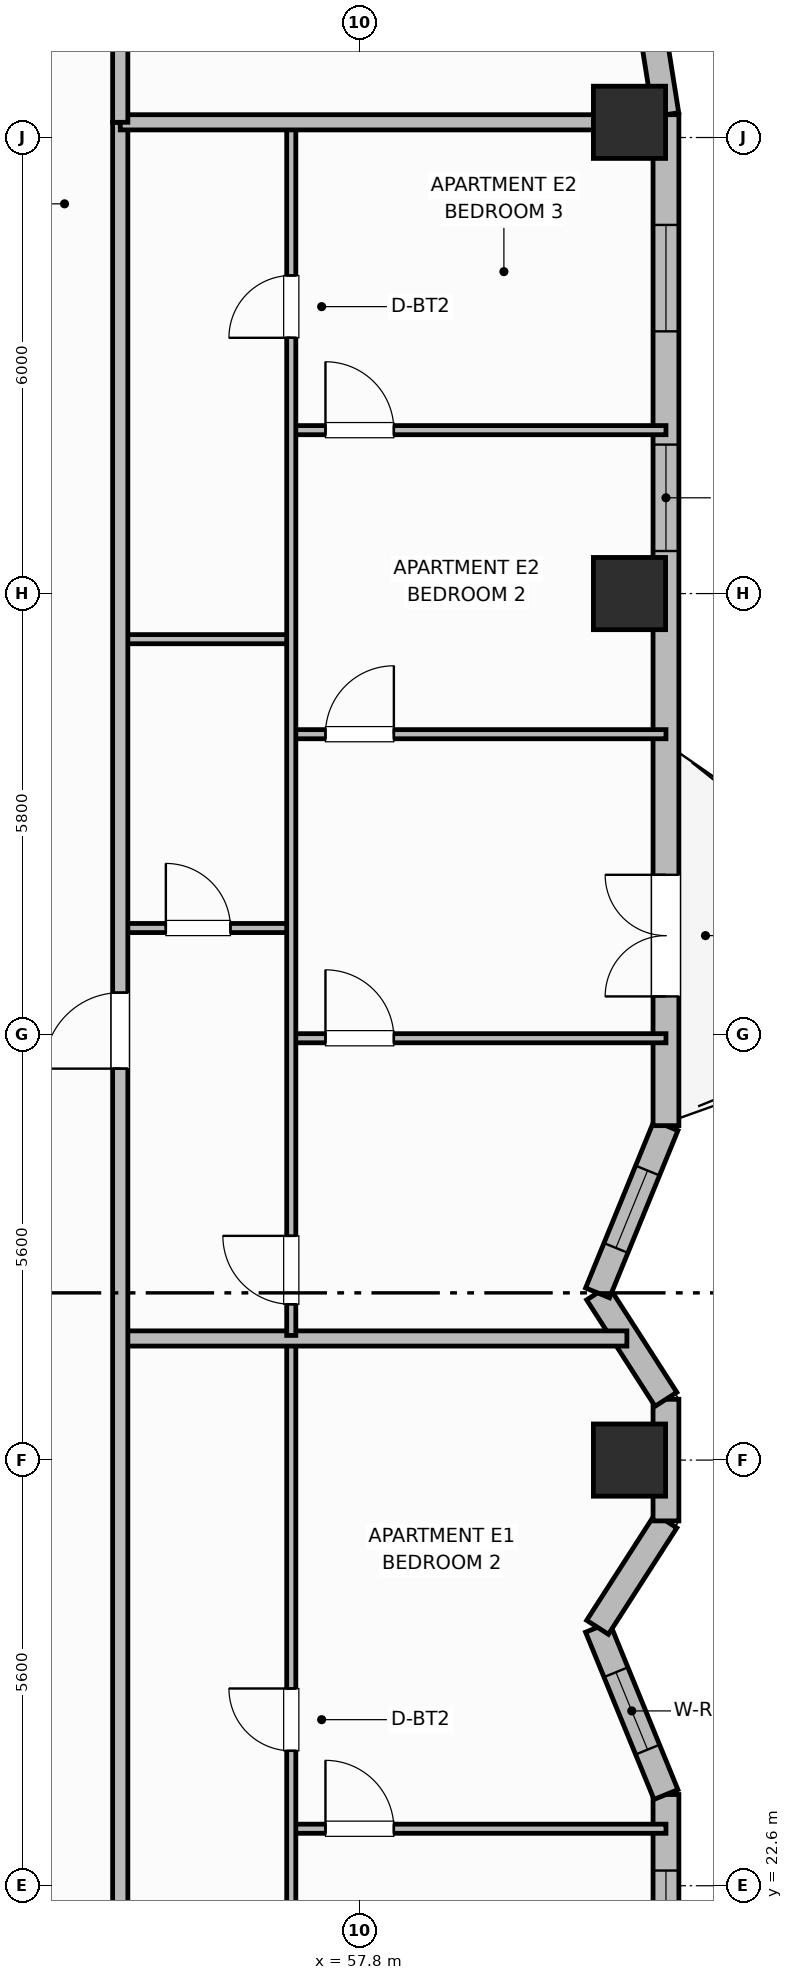
"""IFC4 building model, lengths in metres.
Left out: names, types, materials, properties, quantities, classifications, styles, units other than length and angle.
Written with IfcOpenShell. Run it as: python <this file> out.ifc"""

import sys

from ifc_helpers import new_model, si_unit, direction, frame, frame_2d, origin, origin_2d, place, context, subcontext, project, spatial, rectangle, extrude, element, fill, save


model = new_model("IFC4")
c1 = context("Model", 3, precision=1e-05, world=origin(), true_north=direction((0.0, 1.0)))
c2 = subcontext(c1, "Body", "Model", "MODEL_VIEW")
j1 = project(units=[si_unit("LENGTHUNIT", "METRE"), si_unit("PLANEANGLEUNIT", "RADIAN")], contexts=[c1])
p1 = place(None, origin())
s1 = spatial("IfcSite", under=j1, at=p1, CompositionType="ELEMENT")
p2 = place(p1, origin())
s2 = spatial("IfcBuilding", under=s1, at=p2, CompositionType="ELEMENT")
p3 = place(p2, frame((0.0, 0.0, 162.6)))
s3 = spatial("IfcBuildingStorey", under=s2, at=p3, CompositionType="ELEMENT", Elevation=162.6)
for number, where, z_axis, x_axis in (
    (1, (61.35, 28.2, 0.0), (0.0, 0.0, 1.0), (1.0, 0.0, 0.0)),
    (2, (61.35, 39.6, 0.0), (0.0, 0.0, 1.0), (1.0, 0.0, 0.0)),
    (3, (61.35, 45.8, 0.0), (0.0, 0.0, 1.0), (1.0, 0.0, 0.0)),
):
    element("IfcColumn", number, at=place(p3, frame(where, z_axis=z_axis, x_axis=x_axis)), inside=s3, PredefinedType="COLUMN", context=c2, shape_type="SweptSolid", body=[
        extrude(rectangle(XDim=0.95, YDim=0.95, at=origin_2d()), origin(), (0.0, 0.0, 1.0), 3.7),
    ])
p4 = place(p3, frame((61.83, 10.5, 0.0), z_axis=(0.0, 0.0, 1.0), x_axis=(0.0, 1.0, 0.0)))
e4 = element("IfcWall", 4, at=p4, inside=s3, PredefinedType="SOLIDWALL", context=c2, shape_type="SweptSolid", body=[
    extrude(rectangle(XDim=13.3, YDim=0.34, at=frame_2d((6.65, 0.0))), origin(), (0.0, 0.0, 1.0), 2.72),
])
p5 = place(p4, frame((1.35, 0.0, 0.7)))
e5 = element("IfcOpeningElement", 5, at=p5, cuts=e4, PredefinedType="OPENING", context=c2, shape_type="SweptSolid", body=[
    extrude(rectangle(XDim=1.6, YDim=1.9, at=frame_2d((0.8, 0.95))), frame((0.0, 0.18, 0.0), z_axis=(0.0, -1.0, 0.0), x_axis=(1.0, 0.0, 0.0)), (0.0, 0.0, 1.0), 0.36),
])
p6 = place(p4, frame((8.4, 0.0, 0.7)))
e6 = element("IfcOpeningElement", 6, at=p6, cuts=e4, PredefinedType="OPENING", context=c2, shape_type="SweptSolid", body=[
    extrude(rectangle(XDim=1.6, YDim=1.9, at=frame_2d((0.8, 0.95))), frame((0.0, 0.18, 0.0), z_axis=(0.0, -1.0, 0.0), x_axis=(1.0, 0.0, 0.0)), (0.0, 0.0, 1.0), 0.36),
])
p7 = place(p4, frame((10.7, 0.0, 0.7)))
e7 = element("IfcOpeningElement", 7, at=p7, cuts=e4, PredefinedType="OPENING", context=c2, shape_type="SweptSolid", body=[
    extrude(rectangle(XDim=1.6, YDim=1.9, at=frame_2d((0.8, 0.95))), frame((0.0, 0.18, 0.0), z_axis=(0.0, -1.0, 0.0), x_axis=(1.0, 0.0, 0.0)), (0.0, 0.0, 1.0), 0.36),
])
p8 = place(p3, frame((61.83, 23.8, 0.0), z_axis=(0.0, 0.0, 1.0), x_axis=(-0.378692835005, 0.925522412865, 0.0)))
e8 = element("IfcWall", 8, at=p8, inside=s3, PredefinedType="SOLIDWALL", context=c2, shape_type="SweptSolid", body=[
    extrude(rectangle(XDim=2.377, YDim=0.34, at=frame_2d((1.188, 0.0))), origin(), (0.0, 0.0, 1.0), 2.72),
])
p9 = place(p8, frame((0.638, 0.0, 0.91)))
e9 = element("IfcOpeningElement", 9, at=p9, cuts=e8, PredefinedType="OPENING", context=c2, shape_type="SweptSolid", body=[
    extrude(rectangle(XDim=1.1, YDim=1.65, at=frame_2d((0.55, 0.825))), frame((0.0, 0.18, 0.0), z_axis=(0.0, -1.0, 0.0), x_axis=(1.0, 0.0, 0.0)), (0.0, 0.0, 1.0), 0.36),
])
p10 = place(p3, frame((60.93, 26.0, 0.0), z_axis=(0.0, 0.0, 1.0), x_axis=(0.540846555596, 0.841121277403, 0.0)))
e10 = element("IfcWall", 10, at=p10, inside=s3, PredefinedType="SOLIDWALL", context=c2, shape_type="SweptSolid", body=[
    extrude(rectangle(XDim=1.664, YDim=0.34, at=frame_2d((0.832, 0.0))), origin(), (0.0, 0.0, 1.0), 2.72),
])
p11 = place(p3, frame((61.83, 27.4, 0.0), z_axis=(0.0, 0.0, 1.0), x_axis=(0.0, 1.0, 0.0)))
e11 = element("IfcWall", 11, at=p11, inside=s3, PredefinedType="SOLIDWALL", context=c2, shape_type="SweptSolid", body=[
    extrude(rectangle(XDim=1.6, YDim=0.34, at=frame_2d((0.8, 0.0))), origin(), (0.0, 0.0, 1.0), 2.72),
])
p12 = place(p3, frame((61.83, 29.0, 0.0), z_axis=(0.0, 0.0, 1.0), x_axis=(-0.540846555596, 0.841121277403, 0.0)))
e12 = element("IfcWall", 12, at=p12, inside=s3, PredefinedType="SOLIDWALL", context=c2, shape_type="SweptSolid", body=[
    extrude(rectangle(XDim=1.664, YDim=0.34, at=frame_2d((0.832, 0.0))), origin(), (0.0, 0.0, 1.0), 2.72),
])
p13 = place(p3, frame((60.93, 30.4, 0.0), z_axis=(0.0, 0.0, 1.0), x_axis=(0.378656839344, 0.925537140269, 0.0)))
e13 = element("IfcWall", 13, at=p13, inside=s3, PredefinedType="SOLIDWALL", context=c2, shape_type="SweptSolid", body=[
    extrude(rectangle(XDim=2.377, YDim=0.34, at=frame_2d((1.188, 0.0))), origin(), (0.0, 0.0, 1.0), 2.72),
])
p14 = place(p13, frame((0.638, 0.0, 0.91)))
e14 = element("IfcOpeningElement", 14, at=p14, cuts=e13, PredefinedType="OPENING", context=c2, shape_type="SweptSolid", body=[
    extrude(rectangle(XDim=1.1, YDim=1.65, at=frame_2d((0.55, 0.825))), frame((0.0, 0.18, 0.0), z_axis=(0.0, -1.0, 0.0), x_axis=(1.0, 0.0, 0.0)), (0.0, 0.0, 1.0), 0.36),
])
p15 = place(p3, frame((61.83, 32.6, 0.0), z_axis=(0.0, 0.0, 1.0), x_axis=(0.0, 1.0, 0.0)))
e15 = element("IfcWall", 15, at=p15, inside=s3, PredefinedType="SOLIDWALL", context=c2, shape_type="SweptSolid", body=[
    extrude(rectangle(XDim=13.3, YDim=0.34, at=frame_2d((6.65, 0.0))), origin(), (0.0, 0.0, 1.0), 2.72),
])
p16 = place(p15, frame((1.7, 0.0, 0.0)))
e16 = element("IfcOpeningElement", 16, at=p16, cuts=e15, PredefinedType="OPENING", context=c2, shape_type="SweptSolid", body=[
    extrude(rectangle(XDim=1.6, YDim=2.1, at=frame_2d((0.8, 1.05))), frame((0.0, 0.18, 0.0), z_axis=(0.0, -1.0, 0.0), x_axis=(1.0, 0.0, 0.0)), (0.0, 0.0, 1.0), 0.36),
])
p17 = place(p15, frame((7.56, 0.0, 0.71)))
e17 = element("IfcOpeningElement", 17, at=p17, cuts=e15, PredefinedType="OPENING", context=c2, shape_type="SweptSolid", body=[
    extrude(rectangle(XDim=1.4, YDim=1.85, at=frame_2d((0.7, 0.925))), frame((0.0, 0.18, 0.0), z_axis=(0.0, -1.0, 0.0), x_axis=(1.0, 0.0, 0.0)), (0.0, 0.0, 1.0), 0.36),
])
p18 = place(p15, frame((10.45, 0.0, 0.75)))
e18 = element("IfcOpeningElement", 18, at=p18, cuts=e15, PredefinedType="OPENING", context=c2, shape_type="SweptSolid", body=[
    extrude(rectangle(XDim=1.4, YDim=1.85, at=frame_2d((0.7, 0.925))), frame((0.0, 0.18, 0.0), z_axis=(0.0, -1.0, 0.0), x_axis=(1.0, 0.0, 0.0)), (0.0, 0.0, 1.0), 0.36),
])
p19 = place(p3, frame((61.83, 45.9, 0.0), z_axis=(0.0, 0.0, 1.0), x_axis=(-0.156481329164, 0.987680916907, 0.0)))
e19 = element("IfcWall", 19, at=p19, inside=s3, PredefinedType="SOLIDWALL", context=c2, shape_type="SweptSolid", body=[
    extrude(rectangle(XDim=1.136, YDim=0.34, at=frame_2d((0.568, 0.0))), origin(), (0.0, 0.0, 1.0), 2.72),
])
p20 = place(p3, frame((56.9, 23.35, 0.0), z_axis=(0.0, 0.0, 1.0), x_axis=(1.0, 0.0, 0.0)))
e20 = element("IfcWall", 20, at=p20, inside=s3, PredefinedType="PARTITIONING", context=c2, shape_type="SweptSolid", body=[
    extrude(rectangle(XDim=4.93, YDim=0.12, at=frame_2d((2.465, 0.0))), origin(), (0.0, 0.0, 1.0), 2.55),
])
p21 = place(p20, frame((0.45, 0.0, 0.0)))
e21 = element("IfcOpeningElement", 21, at=p21, cuts=e20, PredefinedType="OPENING", context=c2, shape_type="SweptSolid", body=[
    extrude(rectangle(XDim=0.9, YDim=2.1, at=frame_2d((0.45, 1.05))), frame((0.0, 0.07, 0.0), z_axis=(0.0, -1.0, 0.0), x_axis=(1.0, 0.0, 0.0)), (0.0, 0.0, 1.0), 0.14),
])
p22 = place(p3, frame((56.9, 10.64, 0.0), z_axis=(0.0, 0.0, 1.0), x_axis=(0.0, 1.0, 0.0)))
e22 = element("IfcWall", 22, at=p22, inside=s3, PredefinedType="PARTITIONING", context=c2, shape_type="SweptSolid", body=[
    extrude(rectangle(XDim=19.12, YDim=0.12, at=frame_2d((9.56, 0.0))), origin(), (0.0, 0.0, 1.0), 2.55),
])
p23 = place(p22, frame((0.41, 0.0, 0.0)))
e23 = element("IfcOpeningElement", 23, at=p23, cuts=e22, PredefinedType="OPENING", context=c2, shape_type="SweptSolid", body=[
    extrude(rectangle(XDim=0.9, YDim=2.1, at=frame_2d((0.45, 1.05))), frame((0.0, 0.07, 0.0), z_axis=(0.0, -1.0, 0.0), x_axis=(1.0, 0.0, 0.0)), (0.0, 0.0, 1.0), 0.14),
])
p24 = place(p22, frame((13.735, 0.0, 0.0)))
e24 = element("IfcOpeningElement", 24, at=p24, cuts=e22, PredefinedType="OPENING", context=c2, shape_type="SweptSolid", body=[
    extrude(rectangle(XDim=0.82, YDim=2.08, at=frame_2d((0.41, 1.04))), frame((0.0, 0.07, 0.0), z_axis=(0.0, -1.0, 0.0), x_axis=(1.0, 0.0, 0.0)), (0.0, 0.0, 1.0), 0.14),
])
p25 = place(p3, frame((54.65, 29.8, 0.0), z_axis=(0.0, 0.0, 1.0), x_axis=(1.0, 0.0, 0.0)))
e25 = element("IfcWall", 25, at=p25, inside=s3, PredefinedType="PARTITIONING", context=c2, shape_type="SweptSolid", body=[
    extrude(rectangle(XDim=6.666, YDim=0.2, at=frame_2d((3.333, 0.0))), origin(), (0.0, 0.0, 1.0), 2.55),
])
p26 = place(p3, frame((54.65, 35.2, 0.0), z_axis=(0.0, 0.0, 1.0), x_axis=(1.0, 0.0, 0.0)))
e26 = element("IfcWall", 26, at=p26, inside=s3, PredefinedType="PARTITIONING", context=c2, shape_type="SweptSolid", body=[
    extrude(rectangle(XDim=2.25, YDim=0.12, at=frame_2d((1.125, 0.0))), origin(), (0.0, 0.0, 1.0), 2.55),
])
p27 = place(p26, frame((0.6, 0.0, 0.0)))
e27 = element("IfcOpeningElement", 27, at=p27, cuts=e26, PredefinedType="OPENING", context=c2, shape_type="SweptSolid", body=[
    extrude(rectangle(XDim=0.85, YDim=2.1, at=frame_2d((0.425, 1.05))), frame((0.0, 0.07, 0.0), z_axis=(0.0, -1.0, 0.0), x_axis=(1.0, 0.0, 0.0)), (0.0, 0.0, 1.0), 0.14),
])
p28 = place(p3, frame((54.65, 39.0, 0.0), z_axis=(0.0, 0.0, 1.0), x_axis=(1.0, 0.0, 0.0)))
e28 = element("IfcWall", 28, at=p28, inside=s3, PredefinedType="PARTITIONING", context=c2, shape_type="SweptSolid", body=[
    extrude(rectangle(XDim=2.25, YDim=0.12, at=frame_2d((1.125, 0.0))), origin(), (0.0, 0.0, 1.0), 2.55),
])
p29 = place(p3, frame((56.9, 33.75, 0.0), z_axis=(0.0, 0.0, 1.0), x_axis=(1.0, 0.0, 0.0)))
e29 = element("IfcWall", 29, at=p29, inside=s3, PredefinedType="PARTITIONING", context=c2, shape_type="SweptSolid", body=[
    extrude(rectangle(XDim=4.93, YDim=0.12, at=frame_2d((2.465, 0.0))), origin(), (0.0, 0.0, 1.0), 2.55),
])
p30 = place(p29, frame((0.45, 0.0, 0.0)))
e30 = element("IfcOpeningElement", 30, at=p30, cuts=e29, PredefinedType="OPENING", context=c2, shape_type="SweptSolid", body=[
    extrude(rectangle(XDim=0.9, YDim=2.1, at=frame_2d((0.45, 1.05))), frame((0.0, 0.07, 0.0), z_axis=(0.0, -1.0, 0.0), x_axis=(1.0, 0.0, 0.0)), (0.0, 0.0, 1.0), 0.14),
])
p31 = place(p3, frame((56.9, 37.75, 0.0), z_axis=(0.0, 0.0, 1.0), x_axis=(1.0, 0.0, 0.0)))
e31 = element("IfcWall", 31, at=p31, inside=s3, PredefinedType="PARTITIONING", context=c2, shape_type="SweptSolid", body=[
    extrude(rectangle(XDim=4.93, YDim=0.12, at=frame_2d((2.465, 0.0))), origin(), (0.0, 0.0, 1.0), 2.55),
])
p32 = place(p31, frame((0.45, 0.0, 0.0)))
e32 = element("IfcOpeningElement", 32, at=p32, cuts=e31, PredefinedType="OPENING", context=c2, shape_type="SweptSolid", body=[
    extrude(rectangle(XDim=0.9, YDim=2.1, at=frame_2d((0.45, 1.05))), frame((0.0, 0.07, 0.0), z_axis=(0.0, -1.0, 0.0), x_axis=(1.0, 0.0, 0.0)), (0.0, 0.0, 1.0), 0.14),
])
p33 = place(p3, frame((56.9, 41.75, 0.0), z_axis=(0.0, 0.0, 1.0), x_axis=(1.0, 0.0, 0.0)))
e33 = element("IfcWall", 33, at=p33, inside=s3, PredefinedType="PARTITIONING", context=c2, shape_type="SweptSolid", body=[
    extrude(rectangle(XDim=4.93, YDim=0.12, at=frame_2d((2.465, 0.0))), origin(), (0.0, 0.0, 1.0), 2.55),
])
p34 = place(p33, frame((0.45, 0.0, 0.0)))
e34 = element("IfcOpeningElement", 34, at=p34, cuts=e33, PredefinedType="OPENING", context=c2, shape_type="SweptSolid", body=[
    extrude(rectangle(XDim=0.9, YDim=2.1, at=frame_2d((0.45, 1.05))), frame((0.0, 0.07, 0.0), z_axis=(0.0, -1.0, 0.0), x_axis=(1.0, 0.0, 0.0)), (0.0, 0.0, 1.0), 0.14),
])
p35 = place(p3, frame((56.9, 29.84, 0.0), z_axis=(0.0, 0.0, 1.0), x_axis=(0.0, 1.0, 0.0)))
e35 = element("IfcWall", 35, at=p35, inside=s3, PredefinedType="PARTITIONING", context=c2, shape_type="SweptSolid", body=[
    extrude(rectangle(XDim=15.92, YDim=0.12, at=frame_2d((7.96, 0.0))), origin(), (0.0, 0.0, 1.0), 2.55),
])
p36 = place(p35, frame((0.41, 0.0, 0.0)))
e36 = element("IfcOpeningElement", 36, at=p36, cuts=e35, PredefinedType="OPENING", context=c2, shape_type="SweptSolid", body=[
    extrude(rectangle(XDim=0.9, YDim=2.1, at=frame_2d((0.45, 1.05))), frame((0.0, 0.07, 0.0), z_axis=(0.0, -1.0, 0.0), x_axis=(1.0, 0.0, 0.0)), (0.0, 0.0, 1.0), 0.14),
])
p37 = place(p35, frame((13.125, 0.0, 0.0)))
e37 = element("IfcOpeningElement", 37, at=p37, cuts=e35, PredefinedType="OPENING", context=c2, shape_type="SweptSolid", body=[
    extrude(rectangle(XDim=0.82, YDim=2.08, at=frame_2d((0.41, 1.04))), frame((0.0, 0.07, 0.0), z_axis=(0.0, -1.0, 0.0), x_axis=(1.0, 0.0, 0.0)), (0.0, 0.0, 1.0), 0.14),
])
p38 = place(p3, frame((54.65, 10.6, 0.0), z_axis=(0.0, 0.0, 1.0), x_axis=(0.0, 1.0, 0.0)))
e38 = element("IfcWall", 38, at=p38, inside=s3, PredefinedType="PARTITIONING", context=c2, shape_type="SweptSolid", body=[
    extrude(rectangle(XDim=35.2, YDim=0.2, at=frame_2d((17.6, 0.0))), origin(), (0.0, 0.0, 1.0), 2.55),
])
p39 = place(p38, frame((2.65, 0.0, 0.0)))
e39 = element("IfcOpeningElement", 39, at=p39, cuts=e38, PredefinedType="OPENING", context=c2, shape_type="SweptSolid", body=[
    extrude(rectangle(XDim=1.0, YDim=2.15, at=frame_2d((0.5, 1.075))), frame((0.0, 0.11, 0.0), z_axis=(0.0, -1.0, 0.0), x_axis=(1.0, 0.0, 0.0)), (0.0, 0.0, 1.0), 0.22),
])
p40 = place(p38, frame((22.75, 0.0, 0.0)))
e40 = element("IfcOpeningElement", 40, at=p40, cuts=e38, PredefinedType="OPENING", context=c2, shape_type="SweptSolid", body=[
    extrude(rectangle(XDim=1.0, YDim=2.15, at=frame_2d((0.5, 1.075))), frame((0.0, 0.11, 0.0), z_axis=(0.0, -1.0, 0.0), x_axis=(1.0, 0.0, 0.0)), (0.0, 0.0, 1.0), 0.22),
])
p41 = place(p3, frame((54.65, 45.8, 0.0), z_axis=(0.0, 0.0, 1.0), x_axis=(1.0, 0.0, 0.0)))
e41 = element("IfcWall", 41, at=p41, inside=s3, PredefinedType="PARTITIONING", context=c2, shape_type="SweptSolid", body=[
    extrude(rectangle(XDim=6.76, YDim=0.2, at=frame_2d((3.38, 0.0))), origin(), (0.0, 0.0, 1.0), 2.55),
])
p42 = place(p3, frame((54.65, 45.8, 0.0), z_axis=(0.0, 0.0, 1.0), x_axis=(0.0, 1.0, 0.0)))
e42 = element("IfcWall", 42, at=p42, inside=s3, PredefinedType="PARTITIONING", context=c2, shape_type="SweptSolid", body=[
    extrude(rectangle(XDim=3.73, YDim=0.2, at=frame_2d((1.865, 0.0))), origin(), (0.0, 0.0, 1.0), 2.55),
])
p43 = place(p7, origin())
e43 = element("IfcWindow", 43, at=p43, inside=s3, PartitioningType="SINGLE_PANEL", PredefinedType="WINDOW", context=c2, shape_type="SweptSolid", body=[
    extrude(rectangle(XDim=1.6, YDim=1.9, at=frame_2d((0.8, 0.95))), frame((0.0, 0.03, 0.0), z_axis=(0.0, -1.0, 0.0), x_axis=(1.0, 0.0, 0.0)), (0.0, 0.0, 1.0), 0.06),
])
fill(e7, e43)
p44 = place(p9, origin())
e44 = element("IfcWindow", 44, at=p44, inside=s3, PartitioningType="SINGLE_PANEL", PredefinedType="WINDOW", context=c2, shape_type="SweptSolid", body=[
    extrude(rectangle(XDim=1.1, YDim=1.65, at=frame_2d((0.55, 0.825))), frame((0.0, 0.03, 0.0), z_axis=(0.0, -1.0, 0.0), x_axis=(1.0, 0.0, 0.0)), (0.0, 0.0, 1.0), 0.06),
])
fill(e9, e44)
p45 = place(p14, origin())
e45 = element("IfcWindow", 45, at=p45, inside=s3, PartitioningType="SINGLE_PANEL", PredefinedType="WINDOW", context=c2, shape_type="SweptSolid", body=[
    extrude(rectangle(XDim=1.1, YDim=1.65, at=frame_2d((0.55, 0.825))), frame((0.0, 0.03, 0.0), z_axis=(0.0, -1.0, 0.0), x_axis=(1.0, 0.0, 0.0)), (0.0, 0.0, 1.0), 0.06),
])
fill(e14, e45)
p46 = place(p16, origin())
e46 = element("IfcDoor", 46, at=p46, inside=s3, OperationType="DOUBLE_DOOR_SINGLE_SWING", PredefinedType="DOOR", context=c2, shape_type="SweptSolid", body=[
    extrude(rectangle(XDim=1.6, YDim=2.1, at=frame_2d((0.8, 1.05))), frame((0.0, 0.025, 0.0), z_axis=(0.0, -1.0, 0.0), x_axis=(1.0, 0.0, 0.0)), (0.0, 0.0, 1.0), 0.05),
])
fill(e16, e46)
p47 = place(p17, origin())
e47 = element("IfcWindow", 47, at=p47, inside=s3, PartitioningType="SINGLE_PANEL", PredefinedType="WINDOW", context=c2, shape_type="SweptSolid", body=[
    extrude(rectangle(XDim=1.4, YDim=1.85, at=frame_2d((0.7, 0.925))), frame((0.0, 0.03, 0.0), z_axis=(0.0, -1.0, 0.0), x_axis=(1.0, 0.0, 0.0)), (0.0, 0.0, 1.0), 0.06),
])
fill(e17, e47)
p48 = place(p18, origin())
e48 = element("IfcWindow", 48, at=p48, inside=s3, PartitioningType="SINGLE_PANEL", PredefinedType="WINDOW", context=c2, shape_type="SweptSolid", body=[
    extrude(rectangle(XDim=1.4, YDim=1.85, at=frame_2d((0.7, 0.925))), frame((0.0, 0.03, 0.0), z_axis=(0.0, -1.0, 0.0), x_axis=(1.0, 0.0, 0.0)), (0.0, 0.0, 1.0), 0.06),
])
fill(e18, e48)
p49 = place(p21, origin())
e49 = element("IfcDoor", 49, at=p49, inside=s3, OperationType="SINGLE_SWING_LEFT", PredefinedType="DOOR", context=c2, shape_type="SweptSolid", body=[
    extrude(rectangle(XDim=0.9, YDim=2.1, at=frame_2d((0.45, 1.05))), frame((0.0, 0.025, 0.0), z_axis=(0.0, -1.0, 0.0), x_axis=(1.0, 0.0, 0.0)), (0.0, 0.0, 1.0), 0.05),
])
fill(e21, e49)
p50 = place(p24, origin())
e50 = element("IfcDoor", 50, at=p50, inside=s3, OperationType="SINGLE_SWING_RIGHT", PredefinedType="DOOR", context=c2, shape_type="SweptSolid", body=[
    extrude(rectangle(XDim=0.82, YDim=2.08, at=frame_2d((0.41, 1.04))), frame((0.0, 0.025, 0.0), z_axis=(0.0, -1.0, 0.0), x_axis=(1.0, 0.0, 0.0)), (0.0, 0.0, 1.0), 0.05),
])
fill(e24, e50)
p51 = place(p27, origin())
e51 = element("IfcDoor", 51, at=p51, inside=s3, OperationType="SINGLE_SWING_LEFT", PredefinedType="DOOR", context=c2, shape_type="SweptSolid", body=[
    extrude(rectangle(XDim=0.85, YDim=2.1, at=frame_2d((0.425, 1.05))), frame((0.0, 0.025, 0.0), z_axis=(0.0, -1.0, 0.0), x_axis=(1.0, 0.0, 0.0)), (0.0, 0.0, 1.0), 0.05),
])
fill(e27, e51)
p52 = place(p30, origin())
e52 = element("IfcDoor", 52, at=p52, inside=s3, OperationType="SINGLE_SWING_LEFT", PredefinedType="DOOR", context=c2, shape_type="SweptSolid", body=[
    extrude(rectangle(XDim=0.9, YDim=2.1, at=frame_2d((0.45, 1.05))), frame((0.0, 0.025, 0.0), z_axis=(0.0, -1.0, 0.0), x_axis=(1.0, 0.0, 0.0)), (0.0, 0.0, 1.0), 0.05),
])
fill(e30, e52)
p53 = place(p32, origin())
e53 = element("IfcDoor", 53, at=p53, inside=s3, OperationType="SINGLE_SWING_RIGHT", PredefinedType="DOOR", context=c2, shape_type="SweptSolid", body=[
    extrude(rectangle(XDim=0.9, YDim=2.1, at=frame_2d((0.45, 1.05))), frame((0.0, 0.025, 0.0), z_axis=(0.0, -1.0, 0.0), x_axis=(1.0, 0.0, 0.0)), (0.0, 0.0, 1.0), 0.05),
])
fill(e32, e53)
p54 = place(p34, origin())
e54 = element("IfcDoor", 54, at=p54, inside=s3, OperationType="SINGLE_SWING_LEFT", PredefinedType="DOOR", context=c2, shape_type="SweptSolid", body=[
    extrude(rectangle(XDim=0.9, YDim=2.1, at=frame_2d((0.45, 1.05))), frame((0.0, 0.025, 0.0), z_axis=(0.0, -1.0, 0.0), x_axis=(1.0, 0.0, 0.0)), (0.0, 0.0, 1.0), 0.05),
])
fill(e34, e54)
p55 = place(p36, origin())
e55 = element("IfcDoor", 55, at=p55, inside=s3, OperationType="SINGLE_SWING_RIGHT", PredefinedType="DOOR", context=c2, shape_type="SweptSolid", body=[
    extrude(rectangle(XDim=0.9, YDim=2.1, at=frame_2d((0.45, 1.05))), frame((0.0, 0.025, 0.0), z_axis=(0.0, -1.0, 0.0), x_axis=(1.0, 0.0, 0.0)), (0.0, 0.0, 1.0), 0.05),
])
fill(e36, e55)
p56 = place(p37, origin())
e56 = element("IfcDoor", 56, at=p56, inside=s3, OperationType="SINGLE_SWING_LEFT", PredefinedType="DOOR", context=c2, shape_type="SweptSolid", body=[
    extrude(rectangle(XDim=0.82, YDim=2.08, at=frame_2d((0.41, 1.04))), frame((0.0, 0.025, 0.0), z_axis=(0.0, -1.0, 0.0), x_axis=(1.0, 0.0, 0.0)), (0.0, 0.0, 1.0), 0.05),
])
fill(e37, e56)
p57 = place(p40, origin())
e57 = element("IfcDoor", 57, at=p57, inside=s3, OperationType="SINGLE_SWING_LEFT", PredefinedType="DOOR", context=c2, shape_type="SweptSolid", body=[
    extrude(rectangle(XDim=1.0, YDim=2.15, at=frame_2d((0.5, 1.075))), frame((0.0, 0.025, 0.0), z_axis=(0.0, -1.0, 0.0), x_axis=(1.0, 0.0, 0.0)), (0.0, 0.0, 1.0), 0.05),
])
fill(e40, e57)
save(model, sys.argv[1])
